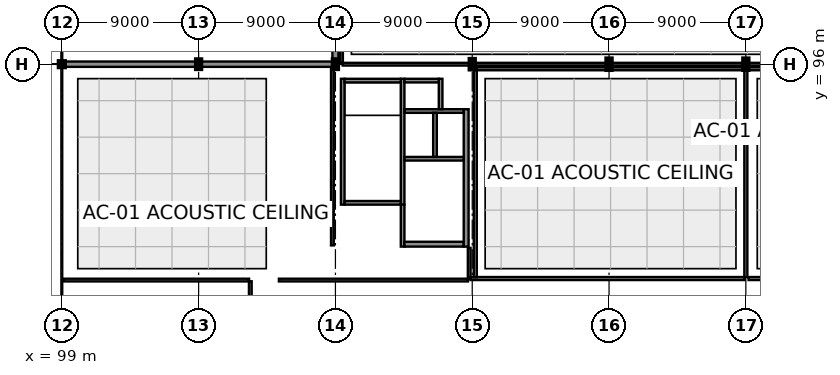
"""IFC4 building model, lengths in metres.
Left out: names, types, materials, properties, quantities, classifications, styles, units other than length and angle.
Written with IfcOpenShell. Run it as: python <this file> out.ifc"""

import sys

from ifc_helpers import new_model, si_unit, direction, frame, frame_2d, origin, origin_2d, place, context, subcontext, project, spatial, rectangle, hollow_circle, i_section, extrude, element, fill, save


model = new_model("IFC4")
c1 = context("Model", 3, precision=1e-05, world=origin(), true_north=direction((0.0, 1.0)))
c2 = subcontext(c1, "Body", "Model", "MODEL_VIEW")
j1 = project(units=[si_unit("LENGTHUNIT", "METRE"), si_unit("PLANEANGLEUNIT", "RADIAN")], contexts=[c1])
p1 = place(None, origin())
s1 = spatial("IfcSite", under=j1, at=p1, CompositionType="ELEMENT")
p2 = place(p1, origin())
s2 = spatial("IfcBuilding", under=s1, at=p2, CompositionType="ELEMENT")
p3 = place(p2, origin())
s3 = spatial("IfcBuildingStorey", under=s2, at=p3, CompositionType="ELEMENT", Elevation=0.0)
p4 = place(p3, frame((99.0, 96.0, 0.0), z_axis=(0.0, 0.0, 1.0), x_axis=(1.0, 0.0, 0.0)))
e1 = element("IfcColumn", 1, at=p4, inside=s3, PredefinedType="PILASTER", context=c2, shape_type="SweptSolid", body=[
    extrude(hollow_circle(Radius=0.178, WallThickness=0.016, at=origin_2d()), origin(), (0.0, 0.0, 1.0), 5.4),
])
for number, where, z_axis, x_axis in (
    (2, (108.0, 96.0, 0.0), (0.0, 0.0, 1.0), (1.0, 0.0, 0.0)),
    (3, (117.0, 96.0, 0.0), (0.0, 0.0, 1.0), (1.0, 0.0, 0.0)),
):
    element("IfcColumn", number, at=place(p3, frame(where, z_axis=z_axis, x_axis=x_axis)), inside=s3, PredefinedType="COLUMN", context=c2, shape_type="SweptSolid", body=[
        extrude(i_section(OverallWidth=0.3, OverallDepth=0.6, WebThickness=0.015, FlangeThickness=0.03, at=origin_2d()), origin(), (0.0, 0.0, 1.0), 5.4),
    ])
p5 = place(p3, frame((126.0, 96.0, 0.0), z_axis=(0.0, 0.0, 1.0), x_axis=(0.0, 1.0, 0.0)))
e4 = element("IfcColumn", 4, at=p5, inside=s3, PredefinedType="COLUMN", context=c2, shape_type="SweptSolid", body=[
    extrude(i_section(OverallWidth=0.3, OverallDepth=0.65, WebThickness=0.016, FlangeThickness=0.031, at=origin_2d()), origin(), (0.0, 0.0, 1.0), 5.4),
])
for number, where, z_axis, x_axis in (
    (5, (135.0, 96.0, 0.0), (0.0, 0.0, 1.0), (1.0, 0.0, 0.0)),
    (6, (144.0, 96.0, 0.0), (0.0, 0.0, 1.0), (1.0, 0.0, 0.0)),
):
    element("IfcColumn", number, at=place(p3, frame(where, z_axis=z_axis, x_axis=x_axis)), inside=s3, PredefinedType="COLUMN", context=c2, shape_type="SweptSolid", body=[
        extrude(i_section(OverallWidth=0.304, OverallDepth=0.716, WebThickness=0.021, FlangeThickness=0.04, at=origin_2d()), origin(), (0.0, 0.0, 1.0), 5.4),
    ])
p6 = place(p3, frame((116.992, 96.0, 0.0), z_axis=(0.0, 0.0, 1.0), x_axis=(-1.0, 0.0, 0.0)))
e7 = element("IfcWall", 7, at=p6, inside=s3, PredefinedType="SOLIDWALL", context=c2, shape_type="SweptSolid", body=[
    extrude(rectangle(XDim=8.984, YDim=0.35, at=frame_2d((4.492, 0.0))), origin(), (0.0, 0.0, 1.0), 4.545),
])
p7 = place(p6, frame((1.792, 0.0, 0.0)))
e8 = element("IfcOpeningElement", 8, at=p7, cuts=e7, PredefinedType="OPENING", context=c2, shape_type="SweptSolid", body=[
    extrude(rectangle(XDim=2.0, YDim=2.5, at=frame_2d((1.0, 1.25))), frame((0.0, 0.19, 0.0), z_axis=(0.0, -1.0, 0.0), x_axis=(1.0, 0.0, 0.0)), (0.0, 0.0, 1.0), 0.38),
])
p8 = place(p3, frame((107.992, 96.0, 0.0), z_axis=(0.0, 0.0, 1.0), x_axis=(-1.0, 0.0, 0.0)))
e9 = element("IfcWall", 9, at=p8, inside=s3, PredefinedType="SOLIDWALL", context=c2, shape_type="SweptSolid", body=[
    extrude(rectangle(XDim=8.768, YDim=0.35, at=frame_2d((4.384, 0.0))), origin(), (0.0, 0.0, 1.0), 4.605),
])
p9 = place(p8, frame((2.934, 0.0, 0.65)))
e10 = element("IfcOpeningElement", 10, at=p9, cuts=e9, PredefinedType="OPENING", context=c2, shape_type="SweptSolid", body=[
    extrude(rectangle(XDim=2.9, YDim=2.9, at=frame_2d((1.45, 1.45))), frame((0.0, 0.19, 0.0), z_axis=(0.0, -1.0, 0.0), x_axis=(1.0, 0.0, 0.0)), (0.0, 0.0, 1.0), 0.38),
])
p10 = place(p3, frame((117.0, 107.852, 0.0), z_axis=(0.0, 0.0, 1.0), x_axis=(0.0, -1.0, 0.0)))
e11 = element("IfcWall", 11, at=p10, inside=s3, PredefinedType="SOLIDWALL", context=c2, shape_type="SweptSolid", body=[
    extrude(rectangle(XDim=11.554, YDim=0.4, at=frame_2d((5.777, 0.0))), origin(), (0.0, 0.0, 1.0), 5.08),
])
p11 = place(p10, frame((2.716, 0.0, 2.35)))
e12 = element("IfcOpeningElement", 12, at=p11, cuts=e11, PredefinedType="OPENING", context=c2, shape_type="SweptSolid", body=[
    extrude(rectangle(XDim=1.5, YDim=0.75, at=frame_2d((0.75, 0.375))), frame((0.0, 0.215, 0.0), z_axis=(0.0, -1.0, 0.0), x_axis=(1.0, 0.0, 0.0)), (0.0, 0.0, 1.0), 0.43),
])
p12 = place(p10, frame((7.338, 0.0, 2.35)))
e13 = element("IfcOpeningElement", 13, at=p12, cuts=e11, PredefinedType="OPENING", context=c2, shape_type="SweptSolid", body=[
    extrude(rectangle(XDim=1.5, YDim=0.75, at=frame_2d((0.75, 0.375))), frame((0.0, 0.215, 0.0), z_axis=(0.0, -1.0, 0.0), x_axis=(1.0, 0.0, 0.0)), (0.0, 0.0, 1.0), 0.43),
])
p13 = place(p3, frame((117.48, 86.76, 0.0), z_axis=(0.0, 0.0, 1.0), x_axis=(0.0, 1.0, 0.0)))
e14 = element("IfcWall", 14, at=p13, inside=s3, PredefinedType="SHEAR", context=c2, shape_type="SweptSolid", body=[
    extrude(rectangle(XDim=8.28, YDim=0.24, at=frame_2d((4.14, 0.0))), origin(), (0.0, 0.0, 1.0), 5.21),
])
p14 = place(p3, frame((121.42, 86.76, 0.0), z_axis=(0.0, 0.0, 1.0), x_axis=(0.0, 1.0, 0.0)))
e15 = element("IfcWall", 15, at=p14, inside=s3, PredefinedType="SHEAR", context=c2, shape_type="SweptSolid", body=[
    extrude(rectangle(XDim=8.28, YDim=0.24, at=frame_2d((4.14, 0.0))), origin(), (0.0, 0.0, 1.0), 5.21),
])
p15 = place(p14, frame((0.54, 0.0, 0.0)))
e16 = element("IfcOpeningElement", 16, at=p15, cuts=e15, PredefinedType="OPENING", context=c2, shape_type="SweptSolid", body=[
    extrude(rectangle(XDim=1.2, YDim=2.15, at=frame_2d((0.6, 1.075))), frame((0.0, 0.135, 0.0), z_axis=(0.0, -1.0, 0.0), x_axis=(1.0, 0.0, 0.0)), (0.0, 0.0, 1.0), 0.27),
])
for number, where, z_axis, x_axis in (
    (17, (117.6, 86.88, 0.0), (0.0, 0.0, 1.0), (1.0, 0.0, 0.0)),
    (18, (117.6, 94.92, 0.0), (0.0, 0.0, 1.0), (1.0, 0.0, 0.0)),
):
    element("IfcWall", number, at=place(p3, frame(where, z_axis=z_axis, x_axis=x_axis)), inside=s3, PredefinedType="SHEAR", context=c2, shape_type="SweptSolid", body=[
        extrude(rectangle(XDim=3.7, YDim=0.24, at=frame_2d((1.85, 0.0))), origin(), (0.0, 0.0, 1.0), 5.21),
    ])
p16 = place(p3, frame((121.42, 84.0, 0.0), z_axis=(0.0, 0.0, 1.0), x_axis=(0.0, 1.0, 0.0)))
e19 = element("IfcWall", 19, at=p16, inside=s3, PredefinedType="SHEAR", context=c2, shape_type="SweptSolid", body=[
    extrude(rectangle(XDim=2.76, YDim=0.24, at=frame_2d((1.38, 0.0))), origin(), (0.0, 0.0, 1.0), 5.06),
])
p17 = place(p3, frame((121.54, 84.16, 0.0), z_axis=(0.0, 0.0, 1.0), x_axis=(1.0, 0.0, 0.0)))
e20 = element("IfcWall", 20, at=p17, inside=s3, PredefinedType="SHEAR", context=c2, shape_type="SweptSolid", body=[
    extrude(rectangle(XDim=3.9, YDim=0.32, at=frame_2d((1.95, 0.0))), origin(), (0.0, 0.0, 1.0), 5.06),
])
p18 = place(p17, frame((1.225, 0.0, 0.0)))
e21 = element("IfcOpeningElement", 21, at=p18, cuts=e20, PredefinedType="OPENING", context=c2, shape_type="SweptSolid", body=[
    extrude(rectangle(XDim=1.45, YDim=2.2, at=frame_2d((0.725, 1.1))), frame((0.0, 0.175, 0.0), z_axis=(0.0, -1.0, 0.0), x_axis=(1.0, 0.0, 0.0)), (0.0, 0.0, 1.0), 0.35),
])
p19 = place(p3, frame((125.6, 84.0, 0.0), z_axis=(0.0, 0.0, 1.0), x_axis=(0.0, 1.0, 0.0)))
e22 = element("IfcWall", 22, at=p19, inside=s3, PredefinedType="SHEAR", context=c2, shape_type="SweptSolid", body=[
    extrude(rectangle(XDim=9.04, YDim=0.32, at=frame_2d((4.52, 0.0))), origin(), (0.0, 0.0, 1.0), 5.06),
])
p20 = place(p3, frame((121.54, 89.78, 0.0), z_axis=(0.0, 0.0, 1.0), x_axis=(1.0, 0.0, 0.0)))
e23 = element("IfcWall", 23, at=p20, inside=s3, PredefinedType="SHEAR", context=c2, shape_type="SweptSolid", body=[
    extrude(rectangle(XDim=3.9, YDim=0.24, at=frame_2d((1.95, 0.0))), origin(), (0.0, 0.0, 1.0), 5.21),
])
p21 = place(p20, frame((0.385, 0.0, 0.0)))
e24 = element("IfcOpeningElement", 24, at=p21, cuts=e23, PredefinedType="OPENING", context=c2, shape_type="SweptSolid", body=[
    extrude(rectangle(XDim=1.3, YDim=2.2, at=frame_2d((0.65, 1.1))), frame((0.0, 0.135, 0.0), z_axis=(0.0, -1.0, 0.0), x_axis=(1.0, 0.0, 0.0)), (0.0, 0.0, 1.0), 0.27),
])
p22 = place(p20, frame((2.335, 0.0, 0.0)))
e25 = element("IfcOpeningElement", 25, at=p22, cuts=e23, PredefinedType="OPENING", context=c2, shape_type="SweptSolid", body=[
    extrude(rectangle(XDim=1.3, YDim=2.2, at=frame_2d((0.65, 1.1))), frame((0.0, 0.135, 0.0), z_axis=(0.0, -1.0, 0.0), x_axis=(1.0, 0.0, 0.0)), (0.0, 0.0, 1.0), 0.27),
])
p23 = place(p3, frame((121.54, 92.92, 0.0), z_axis=(0.0, 0.0, 1.0), x_axis=(1.0, 0.0, 0.0)))
e26 = element("IfcWall", 26, at=p23, inside=s3, PredefinedType="SHEAR", context=c2, shape_type="SweptSolid", body=[
    extrude(rectangle(XDim=3.9, YDim=0.24, at=frame_2d((1.95, 0.0))), origin(), (0.0, 0.0, 1.0), 5.21),
])
p24 = place(p3, frame((123.55, 89.9, 0.0), z_axis=(0.0, 0.0, 1.0), x_axis=(0.0, 1.0, 0.0)))
e27 = element("IfcWall", 27, at=p24, inside=s3, PredefinedType="SHEAR", context=c2, shape_type="SweptSolid", body=[
    extrude(rectangle(XDim=2.9, YDim=0.24, at=frame_2d((1.45, 0.0))), origin(), (0.0, 0.0, 1.0), 5.21),
])
p25 = place(p3, frame((123.92, 93.04, 0.0), z_axis=(0.0, 0.0, 1.0), x_axis=(0.0, 1.0, 0.0)))
e28 = element("IfcWall", 28, at=p25, inside=s3, PredefinedType="SHEAR", context=c2, shape_type="SweptSolid", body=[
    extrude(rectangle(XDim=2.0, YDim=0.24, at=frame_2d((1.0, 0.0))), origin(), (0.0, 0.0, 1.0), 5.21),
])
p26 = place(p3, frame((121.54, 94.92, 0.0), z_axis=(0.0, 0.0, 1.0), x_axis=(1.0, 0.0, 0.0)))
e29 = element("IfcWall", 29, at=p26, inside=s3, PredefinedType="SHEAR", context=c2, shape_type="SweptSolid", body=[
    extrude(rectangle(XDim=2.26, YDim=0.24, at=frame_2d((1.13, 0.0))), origin(), (0.0, 0.0, 1.0), 5.21),
])
p27 = place(p3, frame((99.125, 81.8, 0.0), z_axis=(0.0, 0.0, 1.0), x_axis=(1.0, 0.0, 0.0)))
e30 = element("IfcWall", 30, at=p27, inside=s3, PredefinedType="PARTITIONING", context=c2, shape_type="SweptSolid", body=[
    extrude(rectangle(XDim=12.195, YDim=0.18, at=frame_2d((6.098, 0.0))), origin(), (0.0, 0.0, 1.0), 5.04),
])
p28 = place(p27, frame((5.248, 0.0, 0.0)))
e31 = element("IfcOpeningElement", 31, at=p28, cuts=e30, PredefinedType="OPENING", context=c2, shape_type="SweptSolid", body=[
    extrude(rectangle(XDim=1.7, YDim=2.4, at=frame_2d((0.85, 1.2))), frame((0.0, 0.105, 0.0), z_axis=(0.0, -1.0, 0.0), x_axis=(1.0, 0.0, 0.0)), (0.0, 0.0, 1.0), 0.21),
])
p29 = place(p27, frame((9.245, 0.0, 1.05)))
e32 = element("IfcOpeningElement", 32, at=p29, cuts=e30, PredefinedType="OPENING", context=c2, shape_type="SweptSolid", body=[
    extrude(rectangle(XDim=2.1, YDim=1.2, at=frame_2d((1.05, 0.6))), frame((0.0, 0.105, 0.0), z_axis=(0.0, -1.0, 0.0), x_axis=(1.0, 0.0, 0.0)), (0.0, 0.0, 1.0), 0.21),
])
p30 = place(p3, frame((111.4, 81.72, 0.0), z_axis=(0.0, 0.0, 1.0), x_axis=(0.0, -1.0, 0.0)))
e33 = element("IfcWall", 33, at=p30, inside=s3, PredefinedType="PARTITIONING", context=c2, shape_type="SweptSolid", body=[
    extrude(rectangle(XDim=23.64, YDim=0.18, at=frame_2d((11.82, 0.0))), origin(), (0.0, 0.0, 1.0), 5.04),
])
p31 = place(p30, frame((11.095, 0.0, 0.0)))
e34 = element("IfcOpeningElement", 34, at=p31, cuts=e33, PredefinedType="OPENING", context=c2, shape_type="SweptSolid", body=[
    extrude(rectangle(XDim=1.45, YDim=2.2, at=frame_2d((0.725, 1.1))), frame((0.0, 0.105, 0.0), z_axis=(0.0, -1.0, 0.0), x_axis=(1.0, 0.0, 0.0)), (0.0, 0.0, 1.0), 0.21),
])
p32 = place(p3, frame((125.72, 81.8, 0.0), z_axis=(0.0, 0.0, 1.0), x_axis=(-1.0, 0.0, 0.0)))
e35 = element("IfcWall", 35, at=p32, inside=s3, PredefinedType="PARTITIONING", context=c2, shape_type="SweptSolid", body=[
    extrude(rectangle(XDim=12.44, YDim=0.18, at=frame_2d((6.22, 0.0))), origin(), (0.0, 0.0, 1.0), 5.04),
])
p33 = place(p32, frame((5.495, 0.0, 0.0)))
e36 = element("IfcOpeningElement", 36, at=p33, cuts=e35, PredefinedType="OPENING", context=c2, shape_type="SweptSolid", body=[
    extrude(rectangle(XDim=1.45, YDim=2.2, at=frame_2d((0.725, 1.1))), frame((0.0, 0.105, 0.0), z_axis=(0.0, -1.0, 0.0), x_axis=(1.0, 0.0, 0.0)), (0.0, 0.0, 1.0), 0.21),
])
p34 = place(p3, frame((116.8, 95.72, 0.0), z_axis=(0.0, 0.0, 1.0), x_axis=(0.0, -1.0, 0.0)))
e37 = element("IfcWall", 37, at=p34, inside=s3, PredefinedType="PARTITIONING", context=c2, shape_type="SweptSolid", body=[
    extrude(rectangle(XDim=11.64, YDim=0.18, at=frame_2d((5.82, 0.0))), origin(), (0.0, 0.0, 1.0), 4.295),
])
p35 = place(p3, frame((125.8, 83.92, 0.0), z_axis=(0.0, 0.0, 1.0), x_axis=(0.0, -1.0, 0.0)))
e38 = element("IfcWall", 38, at=p35, inside=s3, PredefinedType="PARTITIONING", context=c2, shape_type="SweptSolid", body=[
    extrude(rectangle(XDim=2.04, YDim=0.18, at=frame_2d((1.02, 0.0))), origin(), (0.0, 0.0, 1.0), 4.445),
])
p36 = place(p3, frame((126.28, 95.7, 0.0), z_axis=(0.0, 0.0, 1.0), x_axis=(1.0, 0.0, 0.0)))
e39 = element("IfcWall", 39, at=p36, inside=s3, PredefinedType="PARTITIONING", context=c2, shape_type="SweptSolid", body=[
    extrude(rectangle(XDim=17.64, YDim=0.2, at=frame_2d((8.82, 0.0))), origin(), (0.0, 0.0, 1.0), 5.04),
])
p37 = place(p3, frame((144.0, 95.62, 0.0), z_axis=(0.0, 0.0, 1.0), x_axis=(0.0, -1.0, 0.0)))
e40 = element("IfcWall", 40, at=p37, inside=s3, PredefinedType="PARTITIONING", context=c2, shape_type="SweptSolid", body=[
    extrude(rectangle(XDim=13.64, YDim=0.2, at=frame_2d((6.82, 0.0))), origin(), (0.0, 0.0, 1.0), 4.405),
])
p38 = place(p3, frame((143.92, 81.9, 0.0), z_axis=(0.0, 0.0, 1.0), x_axis=(-1.0, 0.0, 0.0)))
e41 = element("IfcWall", 41, at=p38, inside=s3, PredefinedType="PARTITIONING", context=c2, shape_type="SweptSolid", body=[
    extrude(rectangle(XDim=18.035, YDim=0.2, at=frame_2d((9.018, 0.0))), origin(), (0.0, 0.0, 1.0), 5.04),
])
p39 = place(p38, frame((8.017, 0.0, 0.0)))
e42 = element("IfcOpeningElement", 42, at=p39, cuts=e41, PredefinedType="OPENING", context=c2, shape_type="SweptSolid", body=[
    extrude(rectangle(XDim=2.0, YDim=2.6, at=frame_2d((1.0, 1.3))), frame((0.0, 0.115, 0.0), z_axis=(0.0, -1.0, 0.0), x_axis=(1.0, 0.0, 0.0)), (0.0, 0.0, 1.0), 0.23),
])
p40 = place(p38, frame((15.385, 0.0, 1.05)))
e43 = element("IfcOpeningElement", 43, at=p40, cuts=e41, PredefinedType="OPENING", context=c2, shape_type="SweptSolid", body=[
    extrude(rectangle(XDim=1.8, YDim=1.1, at=frame_2d((0.9, 0.55))), frame((0.0, 0.115, 0.0), z_axis=(0.0, -1.0, 0.0), x_axis=(1.0, 0.0, 0.0)), (0.0, 0.0, 1.0), 0.23),
])
p41 = place(p3, frame((126.2, 81.98, 0.0), z_axis=(0.0, 0.0, 1.0), x_axis=(0.0, 1.0, 0.0)))
e44 = element("IfcWall", 44, at=p41, inside=s3, PredefinedType="PARTITIONING", context=c2, shape_type="SweptSolid", body=[
    extrude(rectangle(XDim=13.64, YDim=0.2, at=frame_2d((6.82, 0.0))), origin(), (0.0, 0.0, 1.0), 4.445),
])
p42 = place(p3, frame((153.365, 81.9, 0.0), z_axis=(0.0, 0.0, 1.0), x_axis=(-1.0, 0.0, 0.0)))
e45 = element("IfcWall", 45, at=p42, inside=s3, PredefinedType="PARTITIONING", context=c2, shape_type="SweptSolid", body=[
    extrude(rectangle(XDim=9.185, YDim=0.2, at=frame_2d((4.593, 0.0))), origin(), (0.0, 0.0, 1.0), 5.04),
])
p43 = place(p42, frame((3.643, 0.0, 0.0)))
e46 = element("IfcOpeningElement", 46, at=p43, cuts=e45, PredefinedType="OPENING", context=c2, shape_type="SweptSolid", body=[
    extrude(rectangle(XDim=1.9, YDim=2.5, at=frame_2d((0.95, 1.25))), frame((0.0, 0.115, 0.0), z_axis=(0.0, -1.0, 0.0), x_axis=(1.0, 0.0, 0.0)), (0.0, 0.0, 1.0), 0.23),
])
p44 = place(p42, frame((6.835, 0.0, 1.05)))
e47 = element("IfcOpeningElement", 47, at=p44, cuts=e45, PredefinedType="OPENING", context=c2, shape_type="SweptSolid", body=[
    extrude(rectangle(XDim=1.5, YDim=1.1, at=frame_2d((0.75, 0.55))), frame((0.0, 0.115, 0.0), z_axis=(0.0, -1.0, 0.0), x_axis=(1.0, 0.0, 0.0)), (0.0, 0.0, 1.0), 0.23),
])
p45 = place(p3, frame((144.18, 95.7, 0.0), z_axis=(0.0, 0.0, 1.0), x_axis=(1.0, 0.0, 0.0)))
e48 = element("IfcWall", 48, at=p45, inside=s3, PredefinedType="PARTITIONING", context=c2, shape_type="SweptSolid", body=[
    extrude(rectangle(XDim=8.94, YDim=0.2, at=frame_2d((4.47, 0.0))), origin(), (0.0, 0.0, 1.0), 5.04),
])
p46 = place(p3, frame((117.4, 96.08, 0.0), z_axis=(0.0, 0.0, 1.0), x_axis=(0.0, 1.0, 0.0)))
e49 = element("IfcWall", 49, at=p46, inside=s3, PredefinedType="PARTITIONING", context=c2, shape_type="SweptSolid", body=[
    extrude(rectangle(XDim=16.84, YDim=0.18, at=frame_2d((8.42, 0.0))), origin(), (0.0, 0.0, 1.0), 5.04),
])
p47 = place(p3, frame((161.12, 96.0, 0.0), z_axis=(0.0, 0.0, 1.0), x_axis=(-1.0, 0.0, 0.0)))
e50 = element("IfcWall", 50, at=p47, inside=s3, PredefinedType="PARTITIONING", context=c2, shape_type="SweptSolid", body=[
    extrude(rectangle(XDim=35.04, YDim=0.18, at=frame_2d((17.52, 0.0))), origin(), (0.0, 0.0, 1.0), 4.545),
])
p48 = place(p47, frame((5.732, 0.0, 0.0)))
e51 = element("IfcOpeningElement", 51, at=p48, cuts=e50, PredefinedType="OPENING", context=c2, shape_type="SweptSolid", body=[
    extrude(rectangle(XDim=1.15, YDim=2.15, at=frame_2d((0.575, 1.075))), frame((0.0, 0.105, 0.0), z_axis=(0.0, -1.0, 0.0), x_axis=(1.0, 0.0, 0.0)), (0.0, 0.0, 1.0), 0.21),
])
p49 = place(p3, frame((125.92, 96.0, 0.0), z_axis=(0.0, 0.0, 1.0), x_axis=(-1.0, 0.0, 0.0)))
e52 = element("IfcWall", 52, at=p49, inside=s3, PredefinedType="PARTITIONING", context=c2, shape_type="SweptSolid", body=[
    extrude(rectangle(XDim=8.44, YDim=0.18, at=frame_2d((4.22, 0.0))), origin(), (0.0, 0.0, 1.0), 4.545),
])
p50 = place(p7, frame((2.0, 0.0, 0.0), z_axis=(0.0, 0.0, 1.0), x_axis=(-1.0, 0.0, 0.0)))
e53 = element("IfcDoor", 53, at=p50, inside=s3, OperationType="DOUBLE_DOOR_SINGLE_SWING", PredefinedType="DOOR", context=c2, shape_type="SweptSolid", body=[
    extrude(rectangle(XDim=2.0, YDim=2.5, at=frame_2d((1.0, 1.25))), frame((0.0, 0.025, 0.0), z_axis=(0.0, -1.0, 0.0), x_axis=(1.0, 0.0, 0.0)), (0.0, 0.0, 1.0), 0.05),
])
fill(e8, e53)
p51 = place(p9, origin())
e54 = element("IfcWindow", 54, at=p51, inside=s3, PartitioningType="SINGLE_PANEL", PredefinedType="WINDOW", context=c2, shape_type="SweptSolid", body=[
    extrude(rectangle(XDim=2.9, YDim=2.9, at=frame_2d((1.45, 1.45))), frame((0.0, 0.03, 0.0), z_axis=(0.0, -1.0, 0.0), x_axis=(1.0, 0.0, 0.0)), (0.0, 0.0, 1.0), 0.06),
])
fill(e10, e54)
p52 = place(p15, frame((1.2, 0.0, 0.0), z_axis=(0.0, 0.0, 1.0), x_axis=(-1.0, 0.0, 0.0)))
e55 = element("IfcDoor", 55, at=p52, inside=s3, OperationType="SINGLE_SWING_RIGHT", PredefinedType="DOOR", context=c2, shape_type="SweptSolid", body=[
    extrude(rectangle(XDim=1.2, YDim=2.15, at=frame_2d((0.6, 1.075))), frame((0.0, 0.025, 0.0), z_axis=(0.0, -1.0, 0.0), x_axis=(1.0, 0.0, 0.0)), (0.0, 0.0, 1.0), 0.05),
])
fill(e16, e55)
p53 = place(p18, origin())
e56 = element("IfcDoor", 56, at=p53, inside=s3, OperationType="DOUBLE_DOOR_SINGLE_SWING", PredefinedType="DOOR", context=c2, shape_type="SweptSolid", body=[
    extrude(rectangle(XDim=1.45, YDim=2.2, at=frame_2d((0.725, 1.1))), frame((0.0, 0.025, 0.0), z_axis=(0.0, -1.0, 0.0), x_axis=(1.0, 0.0, 0.0)), (0.0, 0.0, 1.0), 0.05),
])
fill(e21, e56)
p54 = place(p21, origin())
e57 = element("IfcDoor", 57, at=p54, inside=s3, OperationType="DOUBLE_DOOR_SLIDING", PredefinedType="DOOR", context=c2, shape_type="SweptSolid", body=[
    extrude(rectangle(XDim=1.3, YDim=2.2, at=frame_2d((0.65, 1.1))), frame((0.0, 0.025, 0.0), z_axis=(0.0, -1.0, 0.0), x_axis=(1.0, 0.0, 0.0)), (0.0, 0.0, 1.0), 0.05),
])
fill(e24, e57)
p55 = place(p22, origin())
e58 = element("IfcDoor", 58, at=p55, inside=s3, OperationType="DOUBLE_DOOR_SLIDING", PredefinedType="DOOR", context=c2, shape_type="SweptSolid", body=[
    extrude(rectangle(XDim=1.3, YDim=2.2, at=frame_2d((0.65, 1.1))), frame((0.0, 0.025, 0.0), z_axis=(0.0, -1.0, 0.0), x_axis=(1.0, 0.0, 0.0)), (0.0, 0.0, 1.0), 0.05),
])
fill(e25, e58)
p56 = place(p33, origin())
e59 = element("IfcDoor", 59, at=p56, inside=s3, OperationType="DOUBLE_DOOR_SINGLE_SWING", PredefinedType="DOOR", context=c2, shape_type="SweptSolid", body=[
    extrude(rectangle(XDim=1.45, YDim=2.2, at=frame_2d((0.725, 1.1))), frame((0.0, 0.025, 0.0), z_axis=(0.0, -1.0, 0.0), x_axis=(1.0, 0.0, 0.0)), (0.0, 0.0, 1.0), 0.05),
])
fill(e36, e59)
p57 = place(p28, origin())
e60 = element("IfcDoor", 60, at=p57, inside=s3, OperationType="DOUBLE_DOOR_SINGLE_SWING", PredefinedType="DOOR", context=c2, shape_type="SweptSolid", body=[
    extrude(rectangle(XDim=1.7, YDim=2.4, at=frame_2d((0.85, 1.2))), frame((0.0, 0.025, 0.0), z_axis=(0.0, -1.0, 0.0), x_axis=(1.0, 0.0, 0.0)), (0.0, 0.0, 1.0), 0.05),
])
fill(e31, e60)
p58 = place(p29, origin())
e61 = element("IfcWindow", 61, at=p58, inside=s3, PartitioningType="SINGLE_PANEL", PredefinedType="WINDOW", context=c2, shape_type="SweptSolid", body=[
    extrude(rectangle(XDim=2.1, YDim=1.2, at=frame_2d((1.05, 0.6))), frame((0.0, 0.03, 0.0), z_axis=(0.0, -1.0, 0.0), x_axis=(1.0, 0.0, 0.0)), (0.0, 0.0, 1.0), 0.06),
])
fill(e32, e61)
p59 = place(p39, frame((2.0, 0.0, 0.0), z_axis=(0.0, 0.0, 1.0), x_axis=(-1.0, 0.0, 0.0)))
e62 = element("IfcDoor", 62, at=p59, inside=s3, OperationType="DOUBLE_DOOR_SINGLE_SWING", PredefinedType="DOOR", context=c2, shape_type="SweptSolid", body=[
    extrude(rectangle(XDim=2.0, YDim=2.6, at=frame_2d((1.0, 1.3))), frame((0.0, 0.025, 0.0), z_axis=(0.0, -1.0, 0.0), x_axis=(1.0, 0.0, 0.0)), (0.0, 0.0, 1.0), 0.05),
])
fill(e42, e62)
p60 = place(p40, origin())
e63 = element("IfcWindow", 63, at=p60, inside=s3, PartitioningType="SINGLE_PANEL", PredefinedType="WINDOW", context=c2, shape_type="SweptSolid", body=[
    extrude(rectangle(XDim=1.8, YDim=1.1, at=frame_2d((0.9, 0.55))), frame((0.0, 0.03, 0.0), z_axis=(0.0, -1.0, 0.0), x_axis=(1.0, 0.0, 0.0)), (0.0, 0.0, 1.0), 0.06),
])
fill(e43, e63)
save(model, sys.argv[1])
